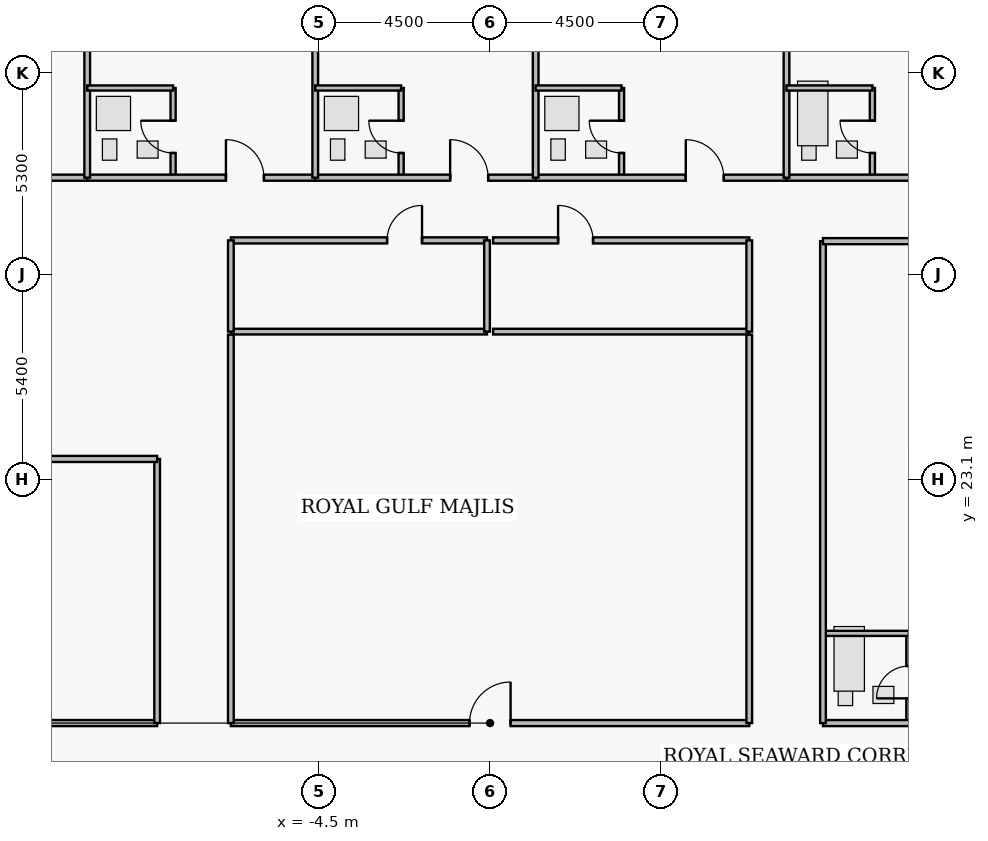
"""IFC4 building model, lengths in metres.
Left out: names, types, materials, properties, quantities, classifications, styles, units other than length and angle.
Written with IfcOpenShell. Run it as: python <this file> out.ifc"""

import sys

from ifc_helpers import new_model, si_unit, direction, frame, frame_2d, origin, place, context, subcontext, project, spatial, rectangle, extrude, element, fill, save


model = new_model("IFC4")
c1 = context("Model", 3, precision=1e-05, world=origin(), true_north=direction((0.0, 1.0)))
c2 = subcontext(c1, "Body", "Model", "MODEL_VIEW")
j1 = project(units=[si_unit("LENGTHUNIT", "METRE"), si_unit("PLANEANGLEUNIT", "RADIAN")], contexts=[c1])
p1 = place(None, origin())
s1 = spatial("IfcSite", under=j1, at=p1, CompositionType="ELEMENT")
p2 = place(p1, origin())
s2 = spatial("IfcBuilding", under=s1, at=p2, CompositionType="ELEMENT")
p3 = place(p2, frame((0.0, 0.0, 243.35)))
s3 = spatial("IfcBuildingStorey", under=s2, at=p3, CompositionType="ELEMENT", Elevation=243.35)
p4 = place(p3, frame((-20.14, 31.05, 0.0), z_axis=(0.0, 0.0, 1.0), x_axis=(1.0, 0.0, 0.0)))
e1 = element("IfcWall", 1, at=p4, inside=s3, PredefinedType="PARTITIONING", context=c2, shape_type="SweptSolid", body=[
    extrude(rectangle(XDim=9.54, YDim=0.16, at=frame_2d((4.77, 0.0))), origin(), (0.0, 0.0, 1.0), 3.48),
])
p5 = place(p4, frame((5.42, 0.0, 0.0)))
e2 = element("IfcOpeningElement", 2, at=p5, cuts=e1, PredefinedType="OPENING", context=c2, shape_type="SweptSolid", body=[
    extrude(rectangle(XDim=1.0, YDim=2.15, at=frame_2d((0.5, 1.075))), frame((0.0, 0.09, 0.0), z_axis=(0.0, -1.0, 0.0), x_axis=(1.0, 0.0, 0.0)), (0.0, 0.0, 1.0), 0.18),
])
p6 = place(p3, frame((-8.34, 31.05, 0.0), z_axis=(0.0, 0.0, 1.0), x_axis=(0.0, 1.0, 0.0)))
e3 = element("IfcWall", 3, at=p6, inside=s3, PredefinedType="PLUMBINGWALL", context=c2, shape_type="SweptSolid", body=[
    extrude(rectangle(XDim=2.36, YDim=0.135, at=frame_2d((1.18, 0.0))), origin(), (0.0, 0.0, 1.0), 3.48),
])
p7 = place(p6, frame((0.65, 0.0, 0.0)))
e4 = element("IfcOpeningElement", 4, at=p7, cuts=e3, PredefinedType="OPENING", context=c2, shape_type="SweptSolid", body=[
    extrude(rectangle(XDim=0.85, YDim=2.1, at=frame_2d((0.425, 1.05))), frame((0.0, 0.077, 0.0), z_axis=(0.0, -1.0, 0.0), x_axis=(1.0, 0.0, 0.0)), (0.0, 0.0, 1.0), 0.155),
])
p8 = place(p3, frame((-10.6, 31.05, 0.0), z_axis=(0.0, 0.0, 1.0), x_axis=(1.0, 0.0, 0.0)))
e5 = element("IfcWall", 5, at=p8, inside=s3, PredefinedType="PARTITIONING", context=c2, shape_type="SweptSolid", body=[
    extrude(rectangle(XDim=6.0, YDim=0.16, at=frame_2d((3.0, 0.0))), origin(), (0.0, 0.0, 1.0), 3.48),
])
p9 = place(p8, frame((3.65, 0.0, 0.0)))
e6 = element("IfcOpeningElement", 6, at=p9, cuts=e5, PredefinedType="OPENING", context=c2, shape_type="SweptSolid", body=[
    extrude(rectangle(XDim=1.0, YDim=2.15, at=frame_2d((0.5, 1.075))), frame((0.0, 0.09, 0.0), z_axis=(0.0, -1.0, 0.0), x_axis=(1.0, 0.0, 0.0)), (0.0, 0.0, 1.0), 0.18),
])
p10 = place(p3, frame((-2.34, 31.05, 0.0), z_axis=(0.0, 0.0, 1.0), x_axis=(0.0, 1.0, 0.0)))
e7 = element("IfcWall", 7, at=p10, inside=s3, PredefinedType="PLUMBINGWALL", context=c2, shape_type="SweptSolid", body=[
    extrude(rectangle(XDim=2.36, YDim=0.135, at=frame_2d((1.18, 0.0))), origin(), (0.0, 0.0, 1.0), 3.48),
])
p11 = place(p10, frame((0.65, 0.0, 0.0)))
e8 = element("IfcOpeningElement", 8, at=p11, cuts=e7, PredefinedType="OPENING", context=c2, shape_type="SweptSolid", body=[
    extrude(rectangle(XDim=0.85, YDim=2.1, at=frame_2d((0.425, 1.05))), frame((0.0, 0.077, 0.0), z_axis=(0.0, -1.0, 0.0), x_axis=(1.0, 0.0, 0.0)), (0.0, 0.0, 1.0), 0.155),
])
p12 = place(p3, frame((-4.6, 31.05, 0.0), z_axis=(0.0, 0.0, 1.0), x_axis=(1.0, 0.0, 0.0)))
e9 = element("IfcWall", 9, at=p12, inside=s3, PredefinedType="PARTITIONING", context=c2, shape_type="SweptSolid", body=[
    extrude(rectangle(XDim=5.8, YDim=0.16, at=frame_2d((2.9, 0.0))), origin(), (0.0, 0.0, 1.0), 3.48),
])
p13 = place(p12, frame((3.55, 0.0, 0.0)))
e10 = element("IfcOpeningElement", 10, at=p13, cuts=e9, PredefinedType="OPENING", context=c2, shape_type="SweptSolid", body=[
    extrude(rectangle(XDim=1.0, YDim=2.15, at=frame_2d((0.5, 1.075))), frame((0.0, 0.09, 0.0), z_axis=(0.0, -1.0, 0.0), x_axis=(1.0, 0.0, 0.0)), (0.0, 0.0, 1.0), 0.18),
])
p14 = place(p3, frame((3.46, 31.05, 0.0), z_axis=(0.0, 0.0, 1.0), x_axis=(0.0, 1.0, 0.0)))
e11 = element("IfcWall", 11, at=p14, inside=s3, PredefinedType="PLUMBINGWALL", context=c2, shape_type="SweptSolid", body=[
    extrude(rectangle(XDim=2.36, YDim=0.135, at=frame_2d((1.18, 0.0))), origin(), (0.0, 0.0, 1.0), 3.48),
])
p15 = place(p14, frame((0.65, 0.0, 0.0)))
e12 = element("IfcOpeningElement", 12, at=p15, cuts=e11, PredefinedType="OPENING", context=c2, shape_type="SweptSolid", body=[
    extrude(rectangle(XDim=0.85, YDim=2.1, at=frame_2d((0.425, 1.05))), frame((0.0, 0.077, 0.0), z_axis=(0.0, -1.0, 0.0), x_axis=(1.0, 0.0, 0.0)), (0.0, 0.0, 1.0), 0.155),
])
p16 = place(p3, frame((1.2, 31.05, 0.0), z_axis=(0.0, 0.0, 1.0), x_axis=(1.0, 0.0, 0.0)))
e13 = element("IfcWall", 13, at=p16, inside=s3, PredefinedType="PARTITIONING", context=c2, shape_type="SweptSolid", body=[
    extrude(rectangle(XDim=6.6, YDim=0.16, at=frame_2d((3.3, 0.0))), origin(), (0.0, 0.0, 1.0), 3.48),
])
p17 = place(p16, frame((3.95, 0.0, 0.0)))
e14 = element("IfcOpeningElement", 14, at=p17, cuts=e13, PredefinedType="OPENING", context=c2, shape_type="SweptSolid", body=[
    extrude(rectangle(XDim=1.0, YDim=2.15, at=frame_2d((0.5, 1.075))), frame((0.0, 0.09, 0.0), z_axis=(0.0, -1.0, 0.0), x_axis=(1.0, 0.0, 0.0)), (0.0, 0.0, 1.0), 0.18),
])
p18 = place(p3, frame((10.06, 31.05, 0.0), z_axis=(0.0, 0.0, 1.0), x_axis=(0.0, 1.0, 0.0)))
e15 = element("IfcWall", 15, at=p18, inside=s3, PredefinedType="PLUMBINGWALL", context=c2, shape_type="SweptSolid", body=[
    extrude(rectangle(XDim=2.36, YDim=0.135, at=frame_2d((1.18, 0.0))), origin(), (0.0, 0.0, 1.0), 3.48),
])
p19 = place(p18, frame((0.65, 0.0, 0.0)))
e16 = element("IfcOpeningElement", 16, at=p19, cuts=e15, PredefinedType="OPENING", context=c2, shape_type="SweptSolid", body=[
    extrude(rectangle(XDim=0.85, YDim=2.1, at=frame_2d((0.425, 1.05))), frame((0.0, 0.077, 0.0), z_axis=(0.0, -1.0, 0.0), x_axis=(1.0, 0.0, 0.0)), (0.0, 0.0, 1.0), 0.155),
])
p20 = place(p3, frame((7.8, 31.05, 0.0), z_axis=(0.0, 0.0, 1.0), x_axis=(1.0, 0.0, 0.0)))
e17 = element("IfcWall", 17, at=p20, inside=s3, PredefinedType="PARTITIONING", context=c2, shape_type="SweptSolid", body=[
    extrude(rectangle(XDim=12.34, YDim=0.16, at=frame_2d((6.17, 0.0))), origin(), (0.0, 0.0, 1.0), 3.48),
])
p21 = place(p20, frame((6.82, 0.0, 0.0)))
e18 = element("IfcOpeningElement", 18, at=p21, cuts=e17, PredefinedType="OPENING", context=c2, shape_type="SweptSolid", body=[
    extrude(rectangle(XDim=1.0, YDim=2.15, at=frame_2d((0.5, 1.075))), frame((0.0, 0.09, 0.0), z_axis=(0.0, -1.0, 0.0), x_axis=(1.0, 0.0, 0.0)), (0.0, 0.0, 1.0), 0.18),
])
p22 = place(p3, frame((-6.82, 29.4, 0.0), z_axis=(0.0, 0.0, 1.0), x_axis=(1.0, 0.0, 0.0)))
e19 = element("IfcWall", 19, at=p22, inside=s3, PredefinedType="PARTITIONING", context=c2, shape_type="SweptSolid", body=[
    extrude(rectangle(XDim=6.74, YDim=0.16, at=frame_2d((3.37, 0.0))), origin(), (0.0, 0.0, 1.0), 3.48),
])
p23 = place(p22, frame((4.11, 0.0, 0.0)))
e20 = element("IfcOpeningElement", 20, at=p23, cuts=e19, PredefinedType="OPENING", context=c2, shape_type="SweptSolid", body=[
    extrude(rectangle(XDim=0.92, YDim=2.12, at=frame_2d((0.46, 1.06))), frame((0.0, 0.09, 0.0), z_axis=(0.0, -1.0, 0.0), x_axis=(1.0, 0.0, 0.0)), (0.0, 0.0, 1.0), 0.18),
])
p24 = place(p3, frame((0.08, 29.4, 0.0), z_axis=(0.0, 0.0, 1.0), x_axis=(1.0, 0.0, 0.0)))
e21 = element("IfcWall", 21, at=p24, inside=s3, PredefinedType="PARTITIONING", context=c2, shape_type="SweptSolid", body=[
    extrude(rectangle(XDim=6.74, YDim=0.16, at=frame_2d((3.37, 0.0))), origin(), (0.0, 0.0, 1.0), 3.48),
])
p25 = place(p24, frame((1.71, 0.0, 0.0)))
e22 = element("IfcOpeningElement", 22, at=p25, cuts=e21, PredefinedType="OPENING", context=c2, shape_type="SweptSolid", body=[
    extrude(rectangle(XDim=0.92, YDim=2.12, at=frame_2d((0.46, 1.06))), frame((0.0, 0.09, 0.0), z_axis=(0.0, -1.0, 0.0), x_axis=(1.0, 0.0, 0.0)), (0.0, 0.0, 1.0), 0.18),
])
p26 = place(p3, frame((-6.82, 16.7, 0.0), z_axis=(0.0, 0.0, 1.0), x_axis=(1.0, 0.0, 0.0)))
e23 = element("IfcWall", 23, at=p26, inside=s3, PredefinedType="PARTITIONING", context=c2, shape_type="SweptSolid", body=[
    extrude(rectangle(XDim=13.64, YDim=0.16, at=frame_2d((6.82, 0.0))), origin(), (0.0, 0.0, 1.0), 3.076),
])
p27 = place(p26, frame((6.28, 0.0, 0.0)))
e24 = element("IfcOpeningElement", 24, at=p27, cuts=e23, PredefinedType="OPENING", context=c2, shape_type="SweptSolid", body=[
    extrude(rectangle(XDim=1.08, YDim=2.18, at=frame_2d((0.54, 1.09))), frame((0.0, 0.09, 0.0), z_axis=(0.0, -1.0, 0.0), x_axis=(1.0, 0.0, 0.0)), (0.0, 0.0, 1.0), 0.18),
])
p28 = place(p3, frame((-22.64, 16.7, 0.0), z_axis=(0.0, 0.0, 1.0), x_axis=(1.0, 0.0, 0.0)))
e25 = element("IfcWall", 25, at=p28, inside=s3, PredefinedType="PARTITIONING", context=c2, shape_type="SweptSolid", body=[
    extrude(rectangle(XDim=13.88, YDim=0.16, at=frame_2d((6.94, 0.0))), origin(), (0.0, 0.0, 1.0), 3.076),
])
p29 = place(p28, frame((7.59, 0.0, 0.0)))
e26 = element("IfcOpeningElement", 26, at=p29, cuts=e25, PredefinedType="OPENING", context=c2, shape_type="SweptSolid", body=[
    extrude(rectangle(XDim=1.0, YDim=2.15, at=frame_2d((0.5, 1.075))), frame((0.0, 0.09, 0.0), z_axis=(0.0, -1.0, 0.0), x_axis=(1.0, 0.0, 0.0)), (0.0, 0.0, 1.0), 0.18),
])
p30 = place(p3, frame((11.02, 16.7, 0.0), z_axis=(0.0, 0.0, 1.0), x_axis=(0.0, 1.0, 0.0)))
e27 = element("IfcWall", 27, at=p30, inside=s3, PredefinedType="PLUMBINGWALL", context=c2, shape_type="SweptSolid", body=[
    extrude(rectangle(XDim=2.36, YDim=0.135, at=frame_2d((1.18, 0.0))), origin(), (0.0, 0.0, 1.0), 3.48),
])
p31 = place(p30, frame((0.65, 0.0, 0.0)))
e28 = element("IfcOpeningElement", 28, at=p31, cuts=e27, PredefinedType="OPENING", context=c2, shape_type="SweptSolid", body=[
    extrude(rectangle(XDim=0.85, YDim=2.1, at=frame_2d((0.425, 1.05))), frame((0.0, 0.077, 0.0), z_axis=(0.0, -1.0, 0.0), x_axis=(1.0, 0.0, 0.0)), (0.0, 0.0, 1.0), 0.155),
])
p32 = place(p3, frame((8.76, 16.7, 0.0), z_axis=(0.0, 0.0, 1.0), x_axis=(1.0, 0.0, 0.0)))
e29 = element("IfcWall", 29, at=p32, inside=s3, PredefinedType="PARTITIONING", context=c2, shape_type="SweptSolid", body=[
    extrude(rectangle(XDim=13.88, YDim=0.16, at=frame_2d((6.94, 0.0))), origin(), (0.0, 0.0, 1.0), 3.076),
])
p33 = place(p32, frame((7.59, 0.0, 0.0)))
e30 = element("IfcOpeningElement", 30, at=p33, cuts=e29, PredefinedType="OPENING", context=c2, shape_type="SweptSolid", body=[
    extrude(rectangle(XDim=1.0, YDim=2.15, at=frame_2d((0.5, 1.075))), frame((0.0, 0.09, 0.0), z_axis=(0.0, -1.0, 0.0), x_axis=(1.0, 0.0, 0.0)), (0.0, 0.0, 1.0), 0.18),
])
p34 = place(p3, frame((-10.6, 31.05, 0.0), z_axis=(0.0, 0.0, 1.0), x_axis=(0.0, 1.0, 0.0)))
e31 = element("IfcWall", 31, at=p34, inside=s3, PredefinedType="PARTITIONING", context=c2, shape_type="SweptSolid", body=[
    extrude(rectangle(XDim=7.87, YDim=0.15, at=frame_2d((3.935, 0.0))), origin(), (0.0, 0.0, 1.0), 3.48),
])
p35 = place(p3, frame((-10.6, 33.41, 0.0), z_axis=(0.0, 0.0, 1.0), x_axis=(1.0, 0.0, 0.0)))
e32 = element("IfcWall", 32, at=p35, inside=s3, PredefinedType="PLUMBINGWALL", context=c2, shape_type="SweptSolid", body=[
    extrude(rectangle(XDim=2.26, YDim=0.135, at=frame_2d((1.13, 0.0))), origin(), (0.0, 0.0, 1.0), 3.076),
])
p36 = place(p3, frame((-4.6, 31.05, 0.0), z_axis=(0.0, 0.0, 1.0), x_axis=(0.0, 1.0, 0.0)))
e33 = element("IfcWall", 33, at=p36, inside=s3, PredefinedType="PARTITIONING", context=c2, shape_type="SweptSolid", body=[
    extrude(rectangle(XDim=7.87, YDim=0.15, at=frame_2d((3.935, 0.0))), origin(), (0.0, 0.0, 1.0), 2.362),
])
p37 = place(p3, frame((-4.6, 33.41, 0.0), z_axis=(0.0, 0.0, 1.0), x_axis=(1.0, 0.0, 0.0)))
e34 = element("IfcWall", 34, at=p37, inside=s3, PredefinedType="PLUMBINGWALL", context=c2, shape_type="SweptSolid", body=[
    extrude(rectangle(XDim=2.26, YDim=0.135, at=frame_2d((1.13, 0.0))), origin(), (0.0, 0.0, 1.0), 3.076),
])
p38 = place(p3, frame((1.2, 31.05, 0.0), z_axis=(0.0, 0.0, 1.0), x_axis=(0.0, 1.0, 0.0)))
e35 = element("IfcWall", 35, at=p38, inside=s3, PredefinedType="PARTITIONING", context=c2, shape_type="SweptSolid", body=[
    extrude(rectangle(XDim=7.87, YDim=0.15, at=frame_2d((3.935, 0.0))), origin(), (0.0, 0.0, 1.0), 3.48),
])
p39 = place(p3, frame((1.2, 33.41, 0.0), z_axis=(0.0, 0.0, 1.0), x_axis=(1.0, 0.0, 0.0)))
e36 = element("IfcWall", 36, at=p39, inside=s3, PredefinedType="PLUMBINGWALL", context=c2, shape_type="SweptSolid", body=[
    extrude(rectangle(XDim=2.26, YDim=0.135, at=frame_2d((1.13, 0.0))), origin(), (0.0, 0.0, 1.0), 3.076),
])
p40 = place(p3, frame((7.8, 31.05, 0.0), z_axis=(0.0, 0.0, 1.0), x_axis=(0.0, 1.0, 0.0)))
e37 = element("IfcWall", 37, at=p40, inside=s3, PredefinedType="PARTITIONING", context=c2, shape_type="SweptSolid", body=[
    extrude(rectangle(XDim=7.87, YDim=0.15, at=frame_2d((3.935, 0.0))), origin(), (0.0, 0.0, 1.0), 3.48),
])
p41 = place(p3, frame((7.8, 33.41, 0.0), z_axis=(0.0, 0.0, 1.0), x_axis=(1.0, 0.0, 0.0)))
e38 = element("IfcWall", 38, at=p41, inside=s3, PredefinedType="PLUMBINGWALL", context=c2, shape_type="SweptSolid", body=[
    extrude(rectangle(XDim=2.26, YDim=0.135, at=frame_2d((1.13, 0.0))), origin(), (0.0, 0.0, 1.0), 3.076),
])
p42 = place(p3, frame((-6.82, 27.0, 0.0), z_axis=(0.0, 0.0, 1.0), x_axis=(1.0, 0.0, 0.0)))
e39 = element("IfcWall", 39, at=p42, inside=s3, PredefinedType="PARTITIONING", context=c2, shape_type="SweptSolid", body=[
    extrude(rectangle(XDim=6.74, YDim=0.15, at=frame_2d((3.37, 0.0))), origin(), (0.0, 0.0, 1.0), 3.48),
])
for number, where, z_axis, x_axis in (
    (40, (-6.82, 27.0, 0.0), (0.0, 0.0, 1.0), (0.0, 1.0, 0.0)),
    (41, (-0.08, 27.0, 0.0), (0.0, 0.0, 1.0), (0.0, 1.0, 0.0)),
):
    element("IfcWall", number, at=place(p3, frame(where, z_axis=z_axis, x_axis=x_axis)), inside=s3, PredefinedType="PARTITIONING", context=c2, shape_type="SweptSolid", body=[
        extrude(rectangle(XDim=2.4, YDim=0.15, at=frame_2d((1.2, 0.0))), origin(), (0.0, 0.0, 1.0), 3.48),
    ])
p43 = place(p3, frame((0.08, 27.0, 0.0), z_axis=(0.0, 0.0, 1.0), x_axis=(1.0, 0.0, 0.0)))
e42 = element("IfcWall", 42, at=p43, inside=s3, PredefinedType="PARTITIONING", context=c2, shape_type="SweptSolid", body=[
    extrude(rectangle(XDim=6.74, YDim=0.15, at=frame_2d((3.37, 0.0))), origin(), (0.0, 0.0, 1.0), 3.48),
])
p44 = place(p3, frame((6.82, 27.0, 0.0), z_axis=(0.0, 0.0, 1.0), x_axis=(0.0, 1.0, 0.0)))
e43 = element("IfcWall", 43, at=p44, inside=s3, PredefinedType="PARTITIONING", context=c2, shape_type="SweptSolid", body=[
    extrude(rectangle(XDim=2.4, YDim=0.15, at=frame_2d((1.2, 0.0))), origin(), (0.0, 0.0, 1.0), 3.48),
])
for number, where, z_axis, x_axis in (
    (44, (-6.82, 16.7, 0.0), (0.0, 0.0, 1.0), (0.0, 1.0, 0.0)),
    (45, (6.82, 16.7, 0.0), (0.0, 0.0, 1.0), (0.0, 1.0, 0.0)),
):
    element("IfcWall", number, at=place(p3, frame(where, z_axis=z_axis, x_axis=x_axis)), inside=s3, PredefinedType="PARTITIONING", context=c2, shape_type="SweptSolid", body=[
        extrude(rectangle(XDim=10.22, YDim=0.15, at=frame_2d((5.11, 0.0))), origin(), (0.0, 0.0, 1.0), 3.48),
    ])
p45 = place(p3, frame((-8.76, 16.7, 0.0), z_axis=(0.0, 0.0, 1.0), x_axis=(0.0, 1.0, 0.0)))
e46 = element("IfcWall", 46, at=p45, inside=s3, PredefinedType="PARTITIONING", context=c2, shape_type="SweptSolid", body=[
    extrude(rectangle(XDim=6.95, YDim=0.15, at=frame_2d((3.475, 0.0))), origin(), (0.0, 0.0, 1.0), 3.48),
])
p46 = place(p3, frame((-22.64, 23.65, 0.0), z_axis=(0.0, 0.0, 1.0), x_axis=(1.0, 0.0, 0.0)))
e47 = element("IfcWall", 47, at=p46, inside=s3, PredefinedType="PARTITIONING", context=c2, shape_type="SweptSolid", body=[
    extrude(rectangle(XDim=13.88, YDim=0.16, at=frame_2d((6.94, 0.0))), origin(), (0.0, 0.0, 1.0), 3.48),
])
p47 = place(p3, frame((8.76, 19.06, 0.0), z_axis=(0.0, 0.0, 1.0), x_axis=(1.0, 0.0, 0.0)))
e48 = element("IfcWall", 48, at=p47, inside=s3, PredefinedType="PLUMBINGWALL", context=c2, shape_type="SweptSolid", body=[
    extrude(rectangle(XDim=2.26, YDim=0.135, at=frame_2d((1.13, 0.0))), origin(), (0.0, 0.0, 1.0), 3.076),
])
p48 = place(p3, frame((8.76, 16.7, 0.0), z_axis=(0.0, 0.0, 1.0), x_axis=(0.0, 1.0, 0.0)))
e49 = element("IfcWall", 49, at=p48, inside=s3, PredefinedType="PARTITIONING", context=c2, shape_type="SweptSolid", body=[
    extrude(rectangle(XDim=12.68, YDim=0.15, at=frame_2d((6.34, 0.0))), origin(), (0.0, 0.0, 1.0), 3.48),
])
p49 = place(p3, frame((8.76, 29.38, 0.0), z_axis=(0.0, 0.0, 1.0), x_axis=(1.0, 0.0, 0.0)))
e50 = element("IfcWall", 50, at=p49, inside=s3, PredefinedType="PARTITIONING", context=c2, shape_type="SweptSolid", body=[
    extrude(rectangle(XDim=13.88, YDim=0.16, at=frame_2d((6.94, 0.0))), origin(), (0.0, 0.0, 1.0), 3.48),
])
p50 = place(p7, origin())
e51 = element("IfcDoor", 51, at=p50, inside=s3, OperationType="SINGLE_SWING_RIGHT", PredefinedType="DOOR", context=c2, shape_type="SweptSolid", body=[
    extrude(rectangle(XDim=0.85, YDim=2.1, at=frame_2d((0.425, 1.05))), frame((0.0, 0.025, 0.0), z_axis=(0.0, -1.0, 0.0), x_axis=(1.0, 0.0, 0.0)), (0.0, 0.0, 1.0), 0.05),
])
fill(e4, e51)
p51 = place(p9, origin())
e52 = element("IfcDoor", 52, at=p51, inside=s3, OperationType="SINGLE_SWING_LEFT", PredefinedType="DOOR", context=c2, shape_type="SweptSolid", body=[
    extrude(rectangle(XDim=1.0, YDim=2.15, at=frame_2d((0.5, 1.075))), frame((0.0, 0.025, 0.0), z_axis=(0.0, -1.0, 0.0), x_axis=(1.0, 0.0, 0.0)), (0.0, 0.0, 1.0), 0.05),
])
fill(e6, e52)
p52 = place(p11, origin())
e53 = element("IfcDoor", 53, at=p52, inside=s3, OperationType="SINGLE_SWING_RIGHT", PredefinedType="DOOR", context=c2, shape_type="SweptSolid", body=[
    extrude(rectangle(XDim=0.85, YDim=2.1, at=frame_2d((0.425, 1.05))), frame((0.0, 0.025, 0.0), z_axis=(0.0, -1.0, 0.0), x_axis=(1.0, 0.0, 0.0)), (0.0, 0.0, 1.0), 0.05),
])
fill(e8, e53)
p53 = place(p13, origin())
e54 = element("IfcDoor", 54, at=p53, inside=s3, OperationType="SINGLE_SWING_LEFT", PredefinedType="DOOR", context=c2, shape_type="SweptSolid", body=[
    extrude(rectangle(XDim=1.0, YDim=2.15, at=frame_2d((0.5, 1.075))), frame((0.0, 0.025, 0.0), z_axis=(0.0, -1.0, 0.0), x_axis=(1.0, 0.0, 0.0)), (0.0, 0.0, 1.0), 0.05),
])
fill(e10, e54)
p54 = place(p15, origin())
e55 = element("IfcDoor", 55, at=p54, inside=s3, OperationType="SINGLE_SWING_RIGHT", PredefinedType="DOOR", context=c2, shape_type="SweptSolid", body=[
    extrude(rectangle(XDim=0.85, YDim=2.1, at=frame_2d((0.425, 1.05))), frame((0.0, 0.025, 0.0), z_axis=(0.0, -1.0, 0.0), x_axis=(1.0, 0.0, 0.0)), (0.0, 0.0, 1.0), 0.05),
])
fill(e12, e55)
p55 = place(p17, origin())
e56 = element("IfcDoor", 56, at=p55, inside=s3, OperationType="SINGLE_SWING_LEFT", PredefinedType="DOOR", context=c2, shape_type="SweptSolid", body=[
    extrude(rectangle(XDim=1.0, YDim=2.15, at=frame_2d((0.5, 1.075))), frame((0.0, 0.025, 0.0), z_axis=(0.0, -1.0, 0.0), x_axis=(1.0, 0.0, 0.0)), (0.0, 0.0, 1.0), 0.05),
])
fill(e14, e56)
p56 = place(p19, origin())
e57 = element("IfcDoor", 57, at=p56, inside=s3, OperationType="SINGLE_SWING_RIGHT", PredefinedType="DOOR", context=c2, shape_type="SweptSolid", body=[
    extrude(rectangle(XDim=0.85, YDim=2.1, at=frame_2d((0.425, 1.05))), frame((0.0, 0.025, 0.0), z_axis=(0.0, -1.0, 0.0), x_axis=(1.0, 0.0, 0.0)), (0.0, 0.0, 1.0), 0.05),
])
fill(e16, e57)
p57 = place(p23, origin())
e58 = element("IfcDoor", 58, at=p57, inside=s3, OperationType="SINGLE_SWING_RIGHT", PredefinedType="DOOR", context=c2, shape_type="SweptSolid", body=[
    extrude(rectangle(XDim=0.92, YDim=2.12, at=frame_2d((0.46, 1.06))), frame((0.0, 0.025, 0.0), z_axis=(0.0, -1.0, 0.0), x_axis=(1.0, 0.0, 0.0)), (0.0, 0.0, 1.0), 0.05),
])
fill(e20, e58)
p58 = place(p25, origin())
e59 = element("IfcDoor", 59, at=p58, inside=s3, OperationType="SINGLE_SWING_LEFT", PredefinedType="DOOR", context=c2, shape_type="SweptSolid", body=[
    extrude(rectangle(XDim=0.92, YDim=2.12, at=frame_2d((0.46, 1.06))), frame((0.0, 0.025, 0.0), z_axis=(0.0, -1.0, 0.0), x_axis=(1.0, 0.0, 0.0)), (0.0, 0.0, 1.0), 0.05),
])
fill(e22, e59)
p59 = place(p27, origin())
e60 = element("IfcDoor", 60, at=p59, inside=s3, OperationType="SINGLE_SWING_RIGHT", PredefinedType="DOOR", context=c2, shape_type="SweptSolid", body=[
    extrude(rectangle(XDim=1.08, YDim=2.18, at=frame_2d((0.54, 1.09))), frame((0.0, 0.025, 0.0), z_axis=(0.0, -1.0, 0.0), x_axis=(1.0, 0.0, 0.0)), (0.0, 0.0, 1.0), 0.05),
])
fill(e24, e60)
p60 = place(p31, origin())
e61 = element("IfcDoor", 61, at=p60, inside=s3, OperationType="SINGLE_SWING_LEFT", PredefinedType="DOOR", context=c2, shape_type="SweptSolid", body=[
    extrude(rectangle(XDim=0.85, YDim=2.1, at=frame_2d((0.425, 1.05))), frame((0.0, 0.025, 0.0), z_axis=(0.0, -1.0, 0.0), x_axis=(1.0, 0.0, 0.0)), (0.0, 0.0, 1.0), 0.05),
])
fill(e28, e61)
save(model, sys.argv[1])
